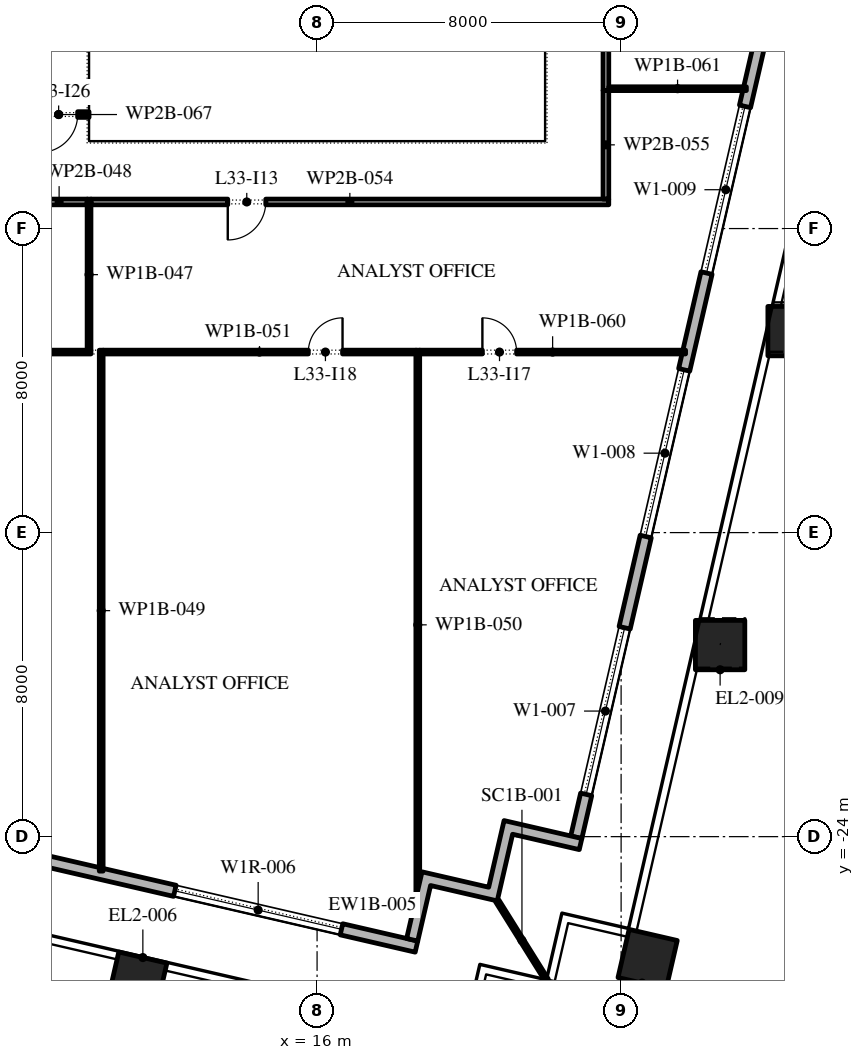
"""IFC4 building model, lengths in metres.
Left out: names, types, materials, properties, quantities, classifications, styles, units other than length and angle.
Written with IfcOpenShell. Run it as: python <this file> out.ifc"""

import sys

from ifc_helpers import new_model, si_unit, direction, frame, frame_2d, origin, origin_2d, place, context, subcontext, project, spatial, polyline, rectangle, outline, extrude, element, fill, save


model = new_model("IFC4")
c1 = context("Model", 3, precision=1e-05, world=origin(), true_north=direction((0.0, 1.0)))
c2 = subcontext(c1, "Body", "Model", "MODEL_VIEW")
j1 = project(units=[si_unit("LENGTHUNIT", "METRE"), si_unit("PLANEANGLEUNIT", "RADIAN")], contexts=[c1])
p1 = place(None, origin())
s1 = spatial("IfcSite", under=j1, at=p1, CompositionType="ELEMENT")
p2 = place(p1, origin())
s2 = spatial("IfcBuilding", under=s1, at=p2, CompositionType="ELEMENT")
p3 = place(p2, frame((0.0, 0.0, 151.8)))
s3 = spatial("IfcBuildingStorey", under=s2, at=p3, CompositionType="ELEMENT", Elevation=151.8)
for number, where, z_axis, x_axis in (
    (1, (11.27, -27.815, 0.0), (0.0, 0.0, 1.0), (0.974, -0.225, 0.0)),
    (2, (24.698, -27.22, 0.0), (0.0, 0.0, 1.0), (0.974, -0.225, 0.0)),
):
    element("IfcColumn", number, at=place(p3, frame(where, z_axis=z_axis, x_axis=x_axis)), inside=s3, PredefinedType="COLUMN", context=c2, shape_type="SweptSolid", body=[
        extrude(rectangle(XDim=1.3, YDim=1.3, at=origin_2d()), origin(), (0.0, 0.0, 1.0), 4.2),
    ])
p4 = place(p3, frame((26.605, -18.959, 0.0), z_axis=(0.002906224189, 0.012671137464, 0.999915494498), x_axis=(-0.974691740237, 0.22355315143, 0.0)))
e3 = element("IfcColumn", 3, at=p4, inside=s3, PredefinedType="COLUMN", context=c2, shape_type="SweptSolid", body=[
    extrude(rectangle(XDim=1.3, YDim=1.3, at=origin_2d()), origin(), (0.0, 0.0, 1.0), 4.2),
])
p5 = place(p3, frame((28.512, -10.699, 0.0), z_axis=(0.005810975449, 0.025335852957, 0.999662106474), x_axis=(-0.974691740237, 0.22355315143, 0.0)))
e4 = element("IfcColumn", 4, at=p5, inside=s3, PredefinedType="COLUMN", context=c2, shape_type="SweptSolid", body=[
    extrude(rectangle(XDim=1.3, YDim=1.3, at=origin_2d()), origin(), (0.0, 0.0, 1.0), 4.201),
])
p6 = place(p3, frame((22.539, -28.569, 0.0), z_axis=(0.0, 0.0, 1.0), x_axis=(0.974370064785, -0.224951054344, 0.0)))
e5 = element("IfcColumn", 5, at=p6, inside=s3, PredefinedType="COLUMN", context=c2, shape_type="SweptSolid", body=[
    extrude(rectangle(XDim=1.3, YDim=1.3, at=origin_2d()), origin(), (0.0, 0.0, 1.0), 4.2),
])
p7 = place(p3, frame((-31.078, -15.421, 0.0), z_axis=(0.0, 0.0, 1.0), x_axis=(0.974370456532, -0.224949357493, 0.0)))
e6 = element("IfcWall", 6, at=p7, inside=s3, PredefinedType="STANDARD", context=c2, shape_type="SweptSolid", body=[
    extrude(rectangle(XDim=51.0, YDim=0.3, at=frame_2d((25.5, 0.0))), origin(), (0.0, 0.0, 1.0), 3.95),
])
p8 = place(p7, frame((1.875, 0.0, 0.45)))
e7 = element("IfcOpeningElement", 7, at=p8, cuts=e6, PredefinedType="OPENING", context=c2, shape_type="SweptSolid", body=[
    extrude(rectangle(XDim=4.5, YDim=2.525, at=frame_2d((2.25, 1.262))), frame((0.0, 0.16, 0.0), z_axis=(0.0, -1.0, 0.0), x_axis=(1.0, 0.0, 0.0)), (0.0, 0.0, 1.0), 0.32),
])
p9 = place(p7, frame((10.275, 0.0, 0.45)))
e8 = element("IfcOpeningElement", 8, at=p9, cuts=e6, PredefinedType="OPENING", context=c2, shape_type="SweptSolid", body=[
    extrude(rectangle(XDim=4.5, YDim=2.525, at=frame_2d((2.25, 1.262))), frame((0.0, 0.16, 0.0), z_axis=(0.0, -1.0, 0.0), x_axis=(1.0, 0.0, 0.0)), (0.0, 0.0, 1.0), 0.32),
])
p10 = place(p7, frame((18.825, 0.0, 0.45)))
e9 = element("IfcOpeningElement", 9, at=p10, cuts=e6, PredefinedType="OPENING", context=c2, shape_type="SweptSolid", body=[
    extrude(rectangle(XDim=4.5, YDim=2.4, at=frame_2d((2.25, 1.2))), frame((0.0, 0.16, 0.0), z_axis=(0.0, -1.0, 0.0), x_axis=(1.0, 0.0, 0.0)), (0.0, 0.0, 1.0), 0.32),
])
p11 = place(p7, frame((27.075, 0.0, 0.0)))
e10 = element("IfcOpeningElement", 10, at=p11, cuts=e6, PredefinedType="OPENING", context=c2, shape_type="SweptSolid", body=[
    extrude(rectangle(XDim=2.4, YDim=2.85, at=frame_2d((1.2, 1.425))), frame((0.0, 0.16, 0.0), z_axis=(0.0, -1.0, 0.0), x_axis=(1.0, 0.0, 0.0)), (0.0, 0.0, 1.0), 0.32),
])
p12 = place(p7, frame((35.925, 0.0, 0.45)))
e11 = element("IfcOpeningElement", 11, at=p12, cuts=e6, PredefinedType="OPENING", context=c2, shape_type="SweptSolid", body=[
    extrude(rectangle(XDim=4.5, YDim=2.4, at=frame_2d((2.25, 1.2))), frame((0.0, 0.16, 0.0), z_axis=(0.0, -1.0, 0.0), x_axis=(1.0, 0.0, 0.0)), (0.0, 0.0, 1.0), 0.32),
])
p13 = place(p7, frame((44.475, 0.0, 0.45)))
e12 = element("IfcOpeningElement", 12, at=p13, cuts=e6, PredefinedType="OPENING", context=c2, shape_type="SweptSolid", body=[
    extrude(rectangle(XDim=4.5, YDim=2.4, at=frame_2d((2.25, 1.2))), frame((0.0, 0.16, 0.0), z_axis=(0.0, -1.0, 0.0), x_axis=(1.0, 0.0, 0.0)), (0.0, 0.0, 1.0), 0.32),
])
p14 = place(p3, frame((22.82, -24.016, 0.0), z_axis=(0.0, 0.0, 1.0), x_axis=(0.224953880882, 0.974369412223, 0.0)))
e13 = element("IfcWall", 13, at=p14, inside=s3, PredefinedType="STANDARD", context=c2, shape_type="SweptSolid", body=[
    extrude(rectangle(XDim=49.5, YDim=0.3, at=frame_2d((24.75, 0.0))), origin(), (0.0, 0.0, 1.0), 3.95),
])
p15 = place(p14, frame((1.157, 0.0, 0.45)))
e14 = element("IfcOpeningElement", 14, at=p15, cuts=e13, PredefinedType="OPENING", context=c2, shape_type="SweptSolid", body=[
    extrude(rectangle(XDim=4.5, YDim=3.05, at=frame_2d((2.25, 1.525))), frame((0.0, 0.16, 0.0), z_axis=(0.0, -1.0, 0.0), x_axis=(1.0, 0.0, 0.0)), (0.0, 0.0, 1.0), 0.32),
])
p16 = place(p14, frame((8.121, 0.0, 0.45)))
e15 = element("IfcOpeningElement", 15, at=p16, cuts=e13, PredefinedType="OPENING", context=c2, shape_type="SweptSolid", body=[
    extrude(rectangle(XDim=4.5, YDim=3.05, at=frame_2d((2.25, 1.525))), frame((0.0, 0.16, 0.0), z_axis=(0.0, -1.0, 0.0), x_axis=(1.0, 0.0, 0.0)), (0.0, 0.0, 1.0), 0.32),
])
p17 = place(p14, frame((15.236, 0.0, 0.45)))
e16 = element("IfcOpeningElement", 16, at=p17, cuts=e13, PredefinedType="OPENING", context=c2, shape_type="SweptSolid", body=[
    extrude(rectangle(XDim=4.5, YDim=3.05, at=frame_2d((2.25, 1.525))), frame((0.0, 0.16, 0.0), z_axis=(0.0, -1.0, 0.0), x_axis=(1.0, 0.0, 0.0)), (0.0, 0.0, 1.0), 0.32),
])
p18 = place(p14, frame((23.4, 0.0, 0.0)))
e17 = element("IfcOpeningElement", 17, at=p18, cuts=e13, PredefinedType="OPENING", context=c2, shape_type="SweptSolid", body=[
    extrude(rectangle(XDim=2.4, YDim=3.5, at=frame_2d((1.2, 1.75))), frame((0.0, 0.16, 0.0), z_axis=(0.0, -1.0, 0.0), x_axis=(1.0, 0.0, 0.0)), (0.0, 0.0, 1.0), 0.32),
])
p19 = place(p14, frame((29.464, 0.0, 0.45)))
e18 = element("IfcOpeningElement", 18, at=p19, cuts=e13, PredefinedType="OPENING", context=c2, shape_type="SweptSolid", body=[
    extrude(rectangle(XDim=4.5, YDim=2.825, at=frame_2d((2.25, 1.413))), frame((0.0, 0.16, 0.0), z_axis=(0.0, -1.0, 0.0), x_axis=(1.0, 0.0, 0.0)), (0.0, 0.0, 1.0), 0.32),
])
p20 = place(p14, frame((36.579, 0.0, 0.45)))
e19 = element("IfcOpeningElement", 19, at=p20, cuts=e13, PredefinedType="OPENING", context=c2, shape_type="SweptSolid", body=[
    extrude(rectangle(XDim=4.5, YDim=2.775, at=frame_2d((2.25, 1.387))), frame((0.0, 0.16, 0.0), z_axis=(0.0, -1.0, 0.0), x_axis=(1.0, 0.0, 0.0)), (0.0, 0.0, 1.0), 0.32),
])
p21 = place(p14, frame((43.693, 0.0, 0.45)))
e20 = element("IfcOpeningElement", 20, at=p21, cuts=e13, PredefinedType="OPENING", context=c2, shape_type="SweptSolid", body=[
    extrude(rectangle(XDim=4.5, YDim=2.7, at=frame_2d((2.25, 1.35))), frame((0.0, 0.16, 0.0), z_axis=(0.0, -1.0, 0.0), x_axis=(1.0, 0.0, 0.0)), (0.0, 0.0, 1.0), 0.32),
])
p22 = place(p3, origin())
e21 = element("IfcWall", 21, at=p22, inside=s3, PredefinedType="STANDARD", context=c2, shape_type="SweptSolid", body=[
    extrude(outline(polyline([(20.515, -25.331), (20.92, -23.577), (22.967, -24.049), (22.899, -24.342), (21.145, -23.937), (20.74, -25.691), (18.986, -25.286), (18.649, -26.747), (18.357, -26.68), (18.762, -24.926), (20.515, -25.331)])), origin(), (0.0, 0.0, 1.0), 3.95),
])
p23 = place(p3, frame((20.74, -25.691, -0.05), z_axis=(0.0, 0.0, 1.0), x_axis=(0.529972121605, -0.848015064914, 0.0)))
e22 = element("IfcWall", 22, at=p23, inside=s3, PredefinedType="STANDARD", context=c2, shape_type="SweptSolid", body=[
    extrude(rectangle(XDim=2.455, YDim=0.1, at=frame_2d((1.228, 0.0))), origin(), (0.0, 0.0, 1.0), 4.0),
])
p24 = place(p3, frame((10.05, -11.25, 0.0), z_axis=(0.0, 0.0, 1.0), x_axis=(-1.0, 0.0, 0.0)))
e23 = element("IfcWall", 23, at=p24, inside=s3, PredefinedType="PARTITIONING", context=c2, shape_type="SweptSolid", body=[
    extrude(rectangle(XDim=11.99, YDim=0.1, at=frame_2d((5.995, 0.0))), origin(), (0.0, 0.0, 1.0), 3.95),
])
p25 = place(p24, frame((4.44, 0.0, 0.0)))
e24 = element("IfcOpeningElement", 24, at=p25, cuts=e23, PredefinedType="OPENING", context=c2, shape_type="SweptSolid", body=[
    extrude(rectangle(XDim=0.9, YDim=2.1, at=frame_2d((0.45, 1.05))), frame((0.0, 0.06, 0.0), z_axis=(0.0, -1.0, 0.0), x_axis=(1.0, 0.0, 0.0)), (0.0, 0.0, 1.0), 0.12),
])
p26 = place(p3, frame((10.0, -11.2, 0.0), z_axis=(0.0, 0.0, 1.0), x_axis=(0.0, 1.0, 0.0)))
e25 = element("IfcWall", 25, at=p26, inside=s3, PredefinedType="PARTITIONING", context=c2, shape_type="SweptSolid", body=[
    extrude(rectangle(XDim=3.975, YDim=0.1, at=frame_2d((1.987, 0.0))), origin(), (0.0, 0.0, 1.0), 3.95),
])
p27 = place(p3, frame((9.95, -7.3, 0.0), z_axis=(0.0, 0.0, 1.0), x_axis=(-1.0, 0.0, 0.0)))
e26 = element("IfcWall", 26, at=p27, inside=s3, PredefinedType="PARTITIONING", context=c2, shape_type="SweptSolid", body=[
    extrude(rectangle(XDim=1.475, YDim=0.15, at=frame_2d((0.737, 0.0))), origin(), (0.0, 0.0, 1.0), 3.95),
])
p28 = place(p3, frame((10.32, -24.907, 0.0), z_axis=(0.0, 0.0, 1.0), x_axis=(0.0, 1.0, 0.0)))
e27 = element("IfcWall", 27, at=p28, inside=s3, PredefinedType="PARTITIONING", context=c2, shape_type="SweptSolid", body=[
    extrude(rectangle(XDim=13.707, YDim=0.1, at=frame_2d((6.854, 0.0))), origin(), (0.0, 0.0, 1.0), 3.95),
])
p29 = place(p3, frame((18.65, -25.654, 0.0), z_axis=(0.0, 0.0, 1.0), x_axis=(0.0, 1.0, 0.0)))
e28 = element("IfcWall", 28, at=p29, inside=s3, PredefinedType="PARTITIONING", context=c2, shape_type="SweptSolid", body=[
    extrude(rectangle(XDim=14.454, YDim=0.1, at=frame_2d((7.227, 0.0))), origin(), (0.0, 0.0, 1.0), 3.95),
])
p30 = place(p3, frame((18.6, -11.25, 0.0), z_axis=(0.0, 0.0, 1.0), x_axis=(-1.0, 0.0, 0.0)))
e29 = element("IfcWall", 29, at=p30, inside=s3, PredefinedType="PARTITIONING", context=c2, shape_type="SweptSolid", body=[
    extrude(rectangle(XDim=8.23, YDim=0.1, at=frame_2d((4.115, 0.0))), origin(), (0.0, 0.0, 1.0), 3.95),
])
p31 = place(p30, frame((1.93, 0.0, 0.0)))
e30 = element("IfcOpeningElement", 30, at=p31, cuts=e29, PredefinedType="OPENING", context=c2, shape_type="SweptSolid", body=[
    extrude(rectangle(XDim=0.9, YDim=2.1, at=frame_2d((0.45, 1.05))), frame((0.0, 0.06, 0.0), z_axis=(0.0, -1.0, 0.0), x_axis=(1.0, 0.0, 0.0)), (0.0, 0.0, 1.0), 0.12),
])
p32 = place(p3, frame((23.675, -7.3, 0.0), z_axis=(0.0, 0.0, 1.0), x_axis=(-1.0, 0.0, 0.0)))
e31 = element("IfcWall", 31, at=p32, inside=s3, PredefinedType="PARTITIONING", context=c2, shape_type="SweptSolid", body=[
    extrude(rectangle(XDim=13.625, YDim=0.15, at=frame_2d((6.812, 0.0))), origin(), (0.0, 0.0, 1.0), 3.95),
])
p33 = place(p32, frame((9.025, 0.0, 0.0)))
e32 = element("IfcOpeningElement", 32, at=p33, cuts=e31, PredefinedType="OPENING", context=c2, shape_type="SweptSolid", body=[
    extrude(rectangle(XDim=1.0, YDim=2.1, at=frame_2d((0.5, 1.05))), frame((0.0, 0.085, 0.0), z_axis=(0.0, -1.0, 0.0), x_axis=(1.0, 0.0, 0.0)), (0.0, 0.0, 1.0), 0.17),
])
p34 = place(p3, frame((23.6, -4.37, 0.0), z_axis=(0.0, 0.0, 1.0), x_axis=(0.0, -1.0, 0.0)))
e33 = element("IfcWall", 33, at=p34, inside=s3, PredefinedType="PARTITIONING", context=c2, shape_type="SweptSolid", body=[
    extrude(rectangle(XDim=2.855, YDim=0.15, at=frame_2d((1.427, 0.0))), origin(), (0.0, 0.0, 1.0), 3.95),
])
p35 = place(p3, frame((23.6, 10.44, 0.0), z_axis=(0.0, 0.0, 1.0), x_axis=(0.0, -1.0, 0.0)))
e34 = element("IfcWall", 34, at=p35, inside=s3, PredefinedType="PARTITIONING", context=c2, shape_type="SweptSolid", body=[
    extrude(rectangle(XDim=14.81, YDim=0.15, at=frame_2d((7.405, 0.0))), origin(), (0.0, 0.0, 1.0), 3.95),
])
p36 = place(p35, frame((6.86, 0.0, 0.0)))
e35 = element("IfcOpeningElement", 35, at=p36, cuts=e34, PredefinedType="OPENING", context=c2, shape_type="SweptSolid", body=[
    extrude(rectangle(XDim=1.0, YDim=2.1, at=frame_2d((0.5, 1.05))), frame((0.0, 0.085, 0.0), z_axis=(0.0, -1.0, 0.0), x_axis=(1.0, 0.0, 0.0)), (0.0, 0.0, 1.0), 0.17),
])
p37 = place(p3, frame((25.696, -11.25, 0.0), z_axis=(0.0, 0.0, 1.0), x_axis=(-1.0, 0.0, 0.0)))
e36 = element("IfcWall", 36, at=p37, inside=s3, PredefinedType="PARTITIONING", context=c2, shape_type="SweptSolid", body=[
    extrude(rectangle(XDim=6.996, YDim=0.1, at=frame_2d((3.498, 0.0))), origin(), (0.0, 0.0, 1.0), 3.95),
])
p38 = place(p37, frame((4.446, 0.0, 0.0)))
e37 = element("IfcOpeningElement", 37, at=p38, cuts=e36, PredefinedType="OPENING", context=c2, shape_type="SweptSolid", body=[
    extrude(rectangle(XDim=0.9, YDim=2.1, at=frame_2d((0.45, 1.05))), frame((0.0, 0.06, 0.0), z_axis=(0.0, -1.0, 0.0), x_axis=(1.0, 0.0, 0.0)), (0.0, 0.0, 1.0), 0.12),
])
p39 = place(p3, frame((27.296, -4.32, 0.0), z_axis=(0.0, 0.0, 1.0), x_axis=(-1.0, 0.0, 0.0)))
e38 = element("IfcWall", 38, at=p39, inside=s3, PredefinedType="PARTITIONING", context=c2, shape_type="SweptSolid", body=[
    extrude(rectangle(XDim=3.621, YDim=0.1, at=frame_2d((1.811, 0.0))), origin(), (0.0, 0.0, 1.0), 3.95),
])
p40 = place(p3, frame((10.0, -5.0, 0.0), z_axis=(0.0, 0.0, 1.0), x_axis=(-1.0, 0.0, 0.0)))
e39 = element("IfcWall", 39, at=p40, inside=s3, PredefinedType="PARTITIONING", context=c2, shape_type="SweptSolid", body=[
    extrude(rectangle(XDim=1.6, YDim=0.15, at=frame_2d((0.8, 0.0))), origin(), (0.0, 0.0, 1.0), 3.95),
])
p41 = place(p40, frame((0.3, 0.0, 0.0)))
e40 = element("IfcOpeningElement", 40, at=p41, cuts=e39, PredefinedType="OPENING", context=c2, shape_type="SweptSolid", body=[
    extrude(rectangle(XDim=1.0, YDim=2.1, at=frame_2d((0.5, 1.05))), frame((0.0, 0.085, 0.0), z_axis=(0.0, -1.0, 0.0), x_axis=(1.0, 0.0, 0.0)), (0.0, 0.0, 1.0), 0.17),
])
p42 = place(p13, origin())
e41 = element("IfcWindow", 41, at=p42, inside=s3, PartitioningType="DOUBLE_PANEL_VERTICAL", PredefinedType="WINDOW", context=c2, shape_type="SweptSolid", body=[
    extrude(rectangle(XDim=4.5, YDim=2.4, at=frame_2d((2.25, 1.2))), frame((0.0, 0.03, 0.0), z_axis=(0.0, -1.0, 0.0), x_axis=(1.0, 0.0, 0.0)), (0.0, 0.0, 1.0), 0.06),
])
fill(e12, e41)
p43 = place(p15, origin())
e42 = element("IfcWindow", 42, at=p43, inside=s3, PartitioningType="DOUBLE_PANEL_VERTICAL", PredefinedType="WINDOW", context=c2, shape_type="SweptSolid", body=[
    extrude(rectangle(XDim=4.5, YDim=3.05, at=frame_2d((2.25, 1.525))), frame((0.0, 0.03, 0.0), z_axis=(0.0, -1.0, 0.0), x_axis=(1.0, 0.0, 0.0)), (0.0, 0.0, 1.0), 0.06),
])
fill(e14, e42)
p44 = place(p16, origin())
e43 = element("IfcWindow", 43, at=p44, inside=s3, PartitioningType="DOUBLE_PANEL_VERTICAL", PredefinedType="WINDOW", context=c2, shape_type="SweptSolid", body=[
    extrude(rectangle(XDim=4.5, YDim=3.05, at=frame_2d((2.25, 1.525))), frame((0.0, 0.03, 0.0), z_axis=(0.0, -1.0, 0.0), x_axis=(1.0, 0.0, 0.0)), (0.0, 0.0, 1.0), 0.06),
])
fill(e15, e43)
p45 = place(p17, origin())
e44 = element("IfcWindow", 44, at=p45, inside=s3, PartitioningType="DOUBLE_PANEL_VERTICAL", PredefinedType="WINDOW", context=c2, shape_type="SweptSolid", body=[
    extrude(rectangle(XDim=4.5, YDim=3.05, at=frame_2d((2.25, 1.525))), frame((0.0, 0.03, 0.0), z_axis=(0.0, -1.0, 0.0), x_axis=(1.0, 0.0, 0.0)), (0.0, 0.0, 1.0), 0.06),
])
fill(e16, e44)
p46 = place(p33, origin())
e45 = element("IfcDoor", 45, at=p46, inside=s3, OperationType="SINGLE_SWING_LEFT", PredefinedType="DOOR", context=c2, shape_type="SweptSolid", body=[
    extrude(rectangle(XDim=1.0, YDim=2.1, at=frame_2d((0.5, 1.05))), frame((0.0, 0.025, 0.0), z_axis=(0.0, -1.0, 0.0), x_axis=(1.0, 0.0, 0.0)), (0.0, 0.0, 1.0), 0.05),
])
fill(e32, e45)
p47 = place(p38, frame((0.9, 0.0, 0.0), z_axis=(0.0, 0.0, 1.0), x_axis=(-1.0, 0.0, 0.0)))
e46 = element("IfcDoor", 46, at=p47, inside=s3, OperationType="SINGLE_SWING_RIGHT", PredefinedType="DOOR", context=c2, shape_type="SweptSolid", body=[
    extrude(rectangle(XDim=0.9, YDim=2.1, at=frame_2d((0.45, 1.05))), frame((0.0, 0.025, 0.0), z_axis=(0.0, -1.0, 0.0), x_axis=(1.0, 0.0, 0.0)), (0.0, 0.0, 1.0), 0.05),
])
fill(e37, e46)
p48 = place(p31, frame((0.9, 0.0, 0.0), z_axis=(0.0, 0.0, 1.0), x_axis=(-1.0, 0.0, 0.0)))
e47 = element("IfcDoor", 47, at=p48, inside=s3, OperationType="SINGLE_SWING_LEFT", PredefinedType="DOOR", context=c2, shape_type="SweptSolid", body=[
    extrude(rectangle(XDim=0.9, YDim=2.1, at=frame_2d((0.45, 1.05))), frame((0.0, 0.025, 0.0), z_axis=(0.0, -1.0, 0.0), x_axis=(1.0, 0.0, 0.0)), (0.0, 0.0, 1.0), 0.05),
])
fill(e30, e47)
p49 = place(p41, origin())
e48 = element("IfcDoor", 48, at=p49, inside=s3, OperationType="SINGLE_SWING_LEFT", PredefinedType="DOOR", context=c2, shape_type="SweptSolid", body=[
    extrude(rectangle(XDim=1.0, YDim=2.1, at=frame_2d((0.5, 1.05))), frame((0.0, 0.025, 0.0), z_axis=(0.0, -1.0, 0.0), x_axis=(1.0, 0.0, 0.0)), (0.0, 0.0, 1.0), 0.05),
])
fill(e40, e48)
save(model, sys.argv[1])
